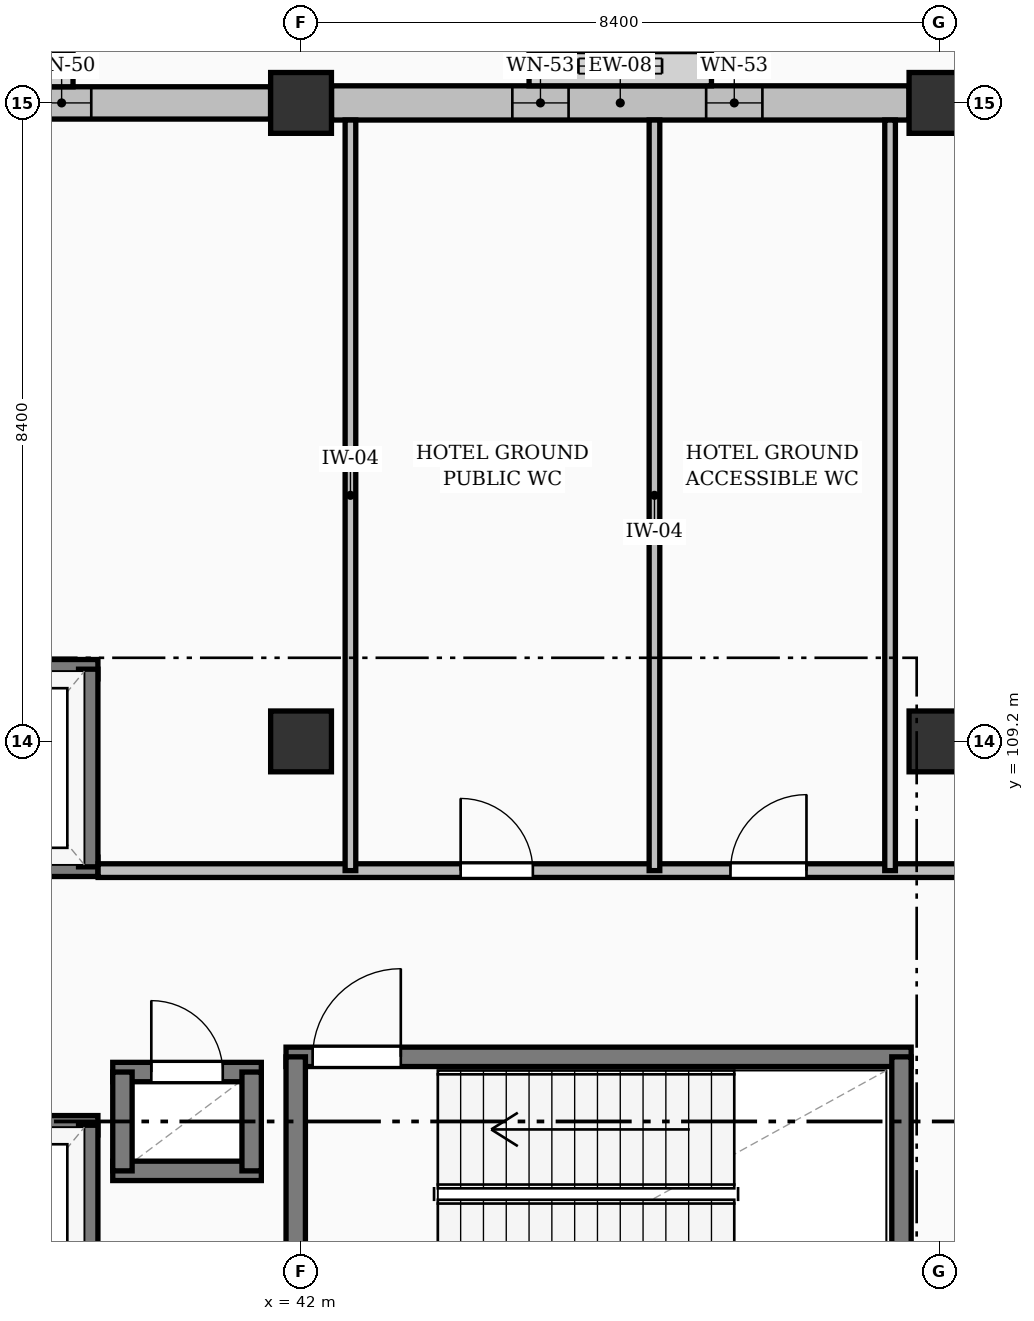
"""IFC4 building model, lengths in metres.
Left out: names, types, materials, properties, quantities, classifications, styles, units other than length and angle.
Written with IfcOpenShell. Run it as: python <this file> out.ifc"""

import sys

from ifc_helpers import new_model, si_unit, direction, frame, frame_2d, origin, origin_2d, place, context, subcontext, project, spatial, rectangle, extrude, element, fill, save


model = new_model("IFC4")
c1 = context("Model", 3, precision=1e-05, world=origin(), true_north=direction((0.0, 1.0)))
c2 = subcontext(c1, "Body", "Model", "MODEL_VIEW")
j1 = project(units=[si_unit("LENGTHUNIT", "METRE"), si_unit("PLANEANGLEUNIT", "RADIAN")], contexts=[c1])
p1 = place(None, origin())
s1 = spatial("IfcSite", under=j1, at=p1, CompositionType="ELEMENT")
p2 = place(p1, origin())
s2 = spatial("IfcBuilding", under=s1, at=p2, CompositionType="ELEMENT")
p3 = place(p2, origin())
s3 = spatial("IfcBuildingStorey", under=s2, at=p3, CompositionType="ELEMENT", Elevation=0.0)
for number, where, z_axis, x_axis in (
    (1, (42.0, 109.2, 0.0), (0.0, 0.0, 1.0), (1.0, 0.0, 0.0)),
    (2, (42.0, 117.6, 0.0), (0.0, 0.0, 1.0), (1.0, 0.0, 0.0)),
    (3, (50.4, 109.2, 0.0), (0.0, 0.0, 1.0), (1.0, 0.0, 0.0)),
    (4, (50.4, 117.6, 0.0), (0.0, 0.0, 1.0), (1.0, 0.0, 0.0)),
):
    element("IfcColumn", number, at=place(p3, frame(where, z_axis=z_axis, x_axis=x_axis)), inside=s3, PredefinedType="COLUMN", context=c2, shape_type="SweptSolid", body=[
        extrude(rectangle(XDim=0.8, YDim=0.8, at=origin_2d()), origin(), (0.0, 0.0, 1.0), 3.92),
    ])
p4 = place(p3, frame((34.001, 117.6, 0.0), z_axis=(0.0, 0.0, 1.0), x_axis=(1.0, 0.0, 0.0)))
e5 = element("IfcWall", 5, at=p4, inside=s3, PredefinedType="SOLIDWALL", context=c2, shape_type="SweptSolid", body=[
    extrude(rectangle(XDim=7.598, YDim=0.425, at=frame_2d((3.799, 0.0))), origin(), (0.0, 0.0, 1.0), 2.825),
])
p5 = place(p4, frame((2.359, 0.0, 0.3)))
e6 = element("IfcOpeningElement", 6, at=p5, cuts=e5, PredefinedType="OPENING", context=c2, shape_type="SweptSolid", body=[
    extrude(rectangle(XDim=0.78, YDim=1.95, at=frame_2d((0.39, 0.975))), frame((0.0, 0.223, 0.0), z_axis=(0.0, -1.0, 0.0), x_axis=(1.0, 0.0, 0.0)), (0.0, 0.0, 1.0), 0.445),
])
p6 = place(p4, frame((4.459, 0.0, 0.3)))
e7 = element("IfcOpeningElement", 7, at=p6, cuts=e5, PredefinedType="OPENING", context=c2, shape_type="SweptSolid", body=[
    extrude(rectangle(XDim=0.78, YDim=1.95, at=frame_2d((0.39, 0.975))), frame((0.0, 0.223, 0.0), z_axis=(0.0, -1.0, 0.0), x_axis=(1.0, 0.0, 0.0)), (0.0, 0.0, 1.0), 0.445),
])
p7 = place(p3, frame((42.401, 117.6, 0.0), z_axis=(0.0, 0.0, 1.0), x_axis=(1.0, 0.0, 0.0)))
e8 = element("IfcWall", 8, at=p7, inside=s3, PredefinedType="SOLIDWALL", context=c2, shape_type="SweptSolid", body=[
    extrude(rectangle(XDim=7.598, YDim=0.45, at=frame_2d((3.799, 0.0))), origin(), (0.0, 0.0, 1.0), 2.825),
])
p8 = place(p7, frame((2.379, 0.0, 0.3)))
e9 = element("IfcOpeningElement", 9, at=p8, cuts=e8, PredefinedType="OPENING", context=c2, shape_type="SweptSolid", body=[
    extrude(rectangle(XDim=0.74, YDim=2.05, at=frame_2d((0.37, 1.025))), frame((0.0, 0.235, 0.0), z_axis=(0.0, -1.0, 0.0), x_axis=(1.0, 0.0, 0.0)), (0.0, 0.0, 1.0), 0.47),
])
p9 = place(p7, frame((4.929, 0.0, 0.3)))
e10 = element("IfcOpeningElement", 10, at=p9, cuts=e8, PredefinedType="OPENING", context=c2, shape_type="SweptSolid", body=[
    extrude(rectangle(XDim=0.74, YDim=2.05, at=frame_2d((0.37, 1.025))), frame((0.0, 0.235, 0.0), z_axis=(0.0, -1.0, 0.0), x_axis=(1.0, 0.0, 0.0)), (0.0, 0.0, 1.0), 0.47),
])
p10 = place(p3, frame((41.802, 105.05, 0.0), z_axis=(0.0, 0.0, 1.0), x_axis=(1.0, 0.0, 0.0)))
e11 = element("IfcWall", 11, at=p10, inside=s3, PredefinedType="SOLIDWALL", context=c2, shape_type="SweptSolid", body=[
    extrude(rectangle(XDim=8.225, YDim=0.255, at=frame_2d((4.113, 0.0))), origin(), (0.0, 0.0, 1.0), 3.64),
])
p11 = place(p10, frame((0.35, 0.0, 0.0)))
e12 = element("IfcOpeningElement", 12, at=p11, cuts=e11, PredefinedType="OPENING", context=c2, shape_type="SweptSolid", body=[
    extrude(rectangle(XDim=1.16, YDim=2.15, at=frame_2d((0.58, 1.075))), frame((0.0, 0.137, 0.0), z_axis=(0.0, -1.0, 0.0), x_axis=(1.0, 0.0, 0.0)), (0.0, 0.0, 1.0), 0.275),
])
for number, where, z_axis, x_axis in (
    (13, (41.93, 101.42, 0.0), (0.0, 0.0, 1.0), (0.0, 1.0, 0.0)),
    (14, (49.9, 101.42, 0.0), (0.0, 0.0, 1.0), (0.0, 1.0, 0.0)),
):
    element("IfcWall", number, at=place(p3, frame(where, z_axis=z_axis, x_axis=x_axis)), inside=s3, PredefinedType="SOLIDWALL", context=c2, shape_type="SweptSolid", body=[
        extrude(rectangle(XDim=3.63, YDim=0.255, at=frame_2d((1.815, 0.0))), origin(), (0.0, 0.0, 1.0), 3.64),
    ])
p12 = place(p3, frame((36.873, 107.55, 0.0), z_axis=(0.0, 0.0, 1.0), x_axis=(1.0, 0.0, 0.0)))
e15 = element("IfcWall", 15, at=p12, inside=s3, PredefinedType="SOLIDWALL", context=c2, shape_type="SweptSolid", body=[
    extrude(rectangle(XDim=2.455, YDim=0.255, at=frame_2d((1.228, 0.0))), origin(), (0.0, 0.0, 1.0), 3.64),
])
p13 = place(p12, frame((0.677, 0.0, 0.0)))
e16 = element("IfcOpeningElement", 16, at=p13, cuts=e15, PredefinedType="OPENING", context=c2, shape_type="SweptSolid", body=[
    extrude(rectangle(XDim=1.1, YDim=2.15, at=frame_2d((0.55, 1.075))), frame((0.0, 0.137, 0.0), z_axis=(0.0, -1.0, 0.0), x_axis=(1.0, 0.0, 0.0)), (0.0, 0.0, 1.0), 0.275),
])
p14 = place(p3, frame((36.873, 110.15, 0.0), z_axis=(0.0, 0.0, 1.0), x_axis=(1.0, 0.0, 0.0)))
e17 = element("IfcWall", 17, at=p14, inside=s3, PredefinedType="SOLIDWALL", context=c2, shape_type="SweptSolid", body=[
    extrude(rectangle(XDim=2.455, YDim=0.255, at=frame_2d((1.228, 0.0))), origin(), (0.0, 0.0, 1.0), 3.64),
])
p15 = place(p3, frame((39.2, 107.55, 0.0), z_axis=(0.0, 0.0, 1.0), x_axis=(0.0, 1.0, 0.0)))
e18 = element("IfcWall", 18, at=p15, inside=s3, PredefinedType="SOLIDWALL", context=c2, shape_type="SweptSolid", body=[
    extrude(rectangle(XDim=2.6, YDim=0.255, at=frame_2d((1.3, 0.0))), origin(), (0.0, 0.0, 1.0), 3.64),
])
p16 = place(p3, frame((36.873, 104.15, 0.0), z_axis=(0.0, 0.0, 1.0), x_axis=(1.0, 0.0, 0.0)))
e19 = element("IfcWall", 19, at=p16, inside=s3, PredefinedType="SOLIDWALL", context=c2, shape_type="SweptSolid", body=[
    extrude(rectangle(XDim=2.455, YDim=0.255, at=frame_2d((1.228, 0.0))), origin(), (0.0, 0.0, 1.0), 3.64),
])
p17 = place(p16, frame((0.677, 0.0, 0.0)))
e20 = element("IfcOpeningElement", 20, at=p17, cuts=e19, PredefinedType="OPENING", context=c2, shape_type="SweptSolid", body=[
    extrude(rectangle(XDim=1.1, YDim=2.15, at=frame_2d((0.55, 1.075))), frame((0.0, 0.137, 0.0), z_axis=(0.0, -1.0, 0.0), x_axis=(1.0, 0.0, 0.0)), (0.0, 0.0, 1.0), 0.275),
])
p18 = place(p3, frame((39.2, 101.55, 0.0), z_axis=(0.0, 0.0, 1.0), x_axis=(0.0, 1.0, 0.0)))
e21 = element("IfcWall", 21, at=p18, inside=s3, PredefinedType="SOLIDWALL", context=c2, shape_type="SweptSolid", body=[
    extrude(rectangle(XDim=2.6, YDim=0.255, at=frame_2d((1.3, 0.0))), origin(), (0.0, 0.0, 1.0), 3.64),
])
p19 = place(p3, frame((39.522, 103.55, 0.0), z_axis=(0.0, 0.0, 1.0), x_axis=(1.0, 0.0, 0.0)))
e22 = element("IfcWall", 22, at=p19, inside=s3, PredefinedType="SOLIDWALL", context=c2, shape_type="SweptSolid", body=[
    extrude(rectangle(XDim=1.955, YDim=0.255, at=frame_2d((0.978, 0.0))), origin(), (0.0, 0.0, 1.0), 3.64),
])
p20 = place(p3, frame((39.522, 104.85, 0.0), z_axis=(0.0, 0.0, 1.0), x_axis=(1.0, 0.0, 0.0)))
e23 = element("IfcWall", 23, at=p20, inside=s3, PredefinedType="SOLIDWALL", context=c2, shape_type="SweptSolid", body=[
    extrude(rectangle(XDim=1.955, YDim=0.255, at=frame_2d((0.978, 0.0))), origin(), (0.0, 0.0, 1.0), 3.64),
])
p21 = place(p20, frame((0.508, 0.0, 0.0)))
e24 = element("IfcOpeningElement", 24, at=p21, cuts=e23, PredefinedType="OPENING", context=c2, shape_type="SweptSolid", body=[
    extrude(rectangle(XDim=0.94, YDim=2.1, at=frame_2d((0.47, 1.05))), frame((0.0, 0.137, 0.0), z_axis=(0.0, -1.0, 0.0), x_axis=(1.0, 0.0, 0.0)), (0.0, 0.0, 1.0), 0.275),
])
for number, where, z_axis, x_axis in (
    (25, (39.65, 103.55, 0.0), (0.0, 0.0, 1.0), (0.0, 1.0, 0.0)),
    (26, (41.35, 103.55, 0.0), (0.0, 0.0, 1.0), (0.0, 1.0, 0.0)),
):
    element("IfcWall", number, at=place(p3, frame(where, z_axis=z_axis, x_axis=x_axis)), inside=s3, PredefinedType="SOLIDWALL", context=c2, shape_type="SweptSolid", body=[
        extrude(rectangle(XDim=1.3, YDim=0.255, at=frame_2d((0.65, 0.0))), origin(), (0.0, 0.0, 1.0), 3.64),
    ])
p22 = place(p3, frame((39.33, 107.5, 0.0), z_axis=(0.0, 0.0, 1.0), x_axis=(1.0, 0.0, 0.0)))
e27 = element("IfcWall", 27, at=p22, inside=s3, PredefinedType="PARTITIONING", context=c2, shape_type="SweptSolid", body=[
    extrude(rectangle(XDim=44.62, YDim=0.18, at=frame_2d((22.31, 0.0))), origin(), (0.0, 0.0, 1.0), 3.64),
])
p23 = place(p22, frame((4.77, 0.0, 0.0)))
e28 = element("IfcOpeningElement", 28, at=p23, cuts=e27, PredefinedType="OPENING", context=c2, shape_type="SweptSolid", body=[
    extrude(rectangle(XDim=0.95, YDim=2.1, at=frame_2d((0.475, 1.05))), frame((0.0, 0.1, 0.0), z_axis=(0.0, -1.0, 0.0), x_axis=(1.0, 0.0, 0.0)), (0.0, 0.0, 1.0), 0.2),
])
p24 = place(p22, frame((8.32, 0.0, 0.0)))
e29 = element("IfcOpeningElement", 29, at=p24, cuts=e27, PredefinedType="OPENING", context=c2, shape_type="SweptSolid", body=[
    extrude(rectangle(XDim=1.0, YDim=2.1, at=frame_2d((0.5, 1.05))), frame((0.0, 0.1, 0.0), z_axis=(0.0, -1.0, 0.0), x_axis=(1.0, 0.0, 0.0)), (0.0, 0.0, 1.0), 0.2),
])
p25 = place(p22, frame((20.57, 0.0, 0.0)))
e30 = element("IfcOpeningElement", 30, at=p25, cuts=e27, PredefinedType="OPENING", context=c2, shape_type="SweptSolid", body=[
    extrude(rectangle(XDim=1.82, YDim=2.25, at=frame_2d((0.91, 1.125))), frame((0.0, 0.1, 0.0), z_axis=(0.0, -1.0, 0.0), x_axis=(1.0, 0.0, 0.0)), (0.0, 0.0, 1.0), 0.2),
])
for number, where, z_axis, x_axis in (
    (31, (42.65, 107.5, 0.0), (0.0, 0.0, 1.0), (0.0, 1.0, 0.0)),
    (32, (46.65, 107.5, 0.0), (0.0, 0.0, 1.0), (0.0, 1.0, 0.0)),
    (33, (49.75, 107.5, 0.0), (0.0, 0.0, 1.0), (0.0, 1.0, 0.0)),
):
    element("IfcWall", number, at=place(p3, frame(where, z_axis=z_axis, x_axis=x_axis)), inside=s3, PredefinedType="PARTITIONING", context=c2, shape_type="SweptSolid", body=[
        extrude(rectangle(XDim=9.875, YDim=0.14, at=frame_2d((4.938, 0.0))), origin(), (0.0, 0.0, 1.0), 3.64),
    ])
p26 = place(p6, origin())
e34 = element("IfcWindow", 34, at=p26, inside=s3, PartitioningType="SINGLE_PANEL", PredefinedType="WINDOW", context=c2, shape_type="SweptSolid", body=[
    extrude(rectangle(XDim=0.78, YDim=1.95, at=frame_2d((0.39, 0.975))), frame((0.0, 0.03, 0.0), z_axis=(0.0, -1.0, 0.0), x_axis=(1.0, 0.0, 0.0)), (0.0, 0.0, 1.0), 0.06),
])
fill(e7, e34)
p27 = place(p8, origin())
e35 = element("IfcWindow", 35, at=p27, inside=s3, PartitioningType="SINGLE_PANEL", PredefinedType="WINDOW", context=c2, shape_type="SweptSolid", body=[
    extrude(rectangle(XDim=0.74, YDim=2.05, at=frame_2d((0.37, 1.025))), frame((0.0, 0.03, 0.0), z_axis=(0.0, -1.0, 0.0), x_axis=(1.0, 0.0, 0.0)), (0.0, 0.0, 1.0), 0.06),
])
fill(e9, e35)
p28 = place(p9, origin())
e36 = element("IfcWindow", 36, at=p28, inside=s3, PartitioningType="SINGLE_PANEL", PredefinedType="WINDOW", context=c2, shape_type="SweptSolid", body=[
    extrude(rectangle(XDim=0.74, YDim=2.05, at=frame_2d((0.37, 1.025))), frame((0.0, 0.03, 0.0), z_axis=(0.0, -1.0, 0.0), x_axis=(1.0, 0.0, 0.0)), (0.0, 0.0, 1.0), 0.06),
])
fill(e10, e36)
p29 = place(p11, origin())
e37 = element("IfcDoor", 37, at=p29, inside=s3, OperationType="SINGLE_SWING_RIGHT", PredefinedType="DOOR", context=c2, shape_type="SweptSolid", body=[
    extrude(rectangle(XDim=1.16, YDim=2.15, at=frame_2d((0.58, 1.075))), frame((0.0, 0.025, 0.0), z_axis=(0.0, -1.0, 0.0), x_axis=(1.0, 0.0, 0.0)), (0.0, 0.0, 1.0), 0.05),
])
fill(e12, e37)
p30 = place(p21, origin())
e38 = element("IfcDoor", 38, at=p30, inside=s3, OperationType="SINGLE_SWING_LEFT", PredefinedType="DOOR", context=c2, shape_type="SweptSolid", body=[
    extrude(rectangle(XDim=0.94, YDim=2.1, at=frame_2d((0.47, 1.05))), frame((0.0, 0.025, 0.0), z_axis=(0.0, -1.0, 0.0), x_axis=(1.0, 0.0, 0.0)), (0.0, 0.0, 1.0), 0.05),
])
fill(e24, e38)
p31 = place(p23, origin())
e39 = element("IfcDoor", 39, at=p31, inside=s3, OperationType="SINGLE_SWING_LEFT", PredefinedType="DOOR", context=c2, shape_type="SweptSolid", body=[
    extrude(rectangle(XDim=0.95, YDim=2.1, at=frame_2d((0.475, 1.05))), frame((0.0, 0.025, 0.0), z_axis=(0.0, -1.0, 0.0), x_axis=(1.0, 0.0, 0.0)), (0.0, 0.0, 1.0), 0.05),
])
fill(e28, e39)
p32 = place(p24, origin())
e40 = element("IfcDoor", 40, at=p32, inside=s3, OperationType="SINGLE_SWING_RIGHT", PredefinedType="DOOR", context=c2, shape_type="SweptSolid", body=[
    extrude(rectangle(XDim=1.0, YDim=2.1, at=frame_2d((0.5, 1.05))), frame((0.0, 0.025, 0.0), z_axis=(0.0, -1.0, 0.0), x_axis=(1.0, 0.0, 0.0)), (0.0, 0.0, 1.0), 0.05),
])
fill(e29, e40)
save(model, sys.argv[1])
